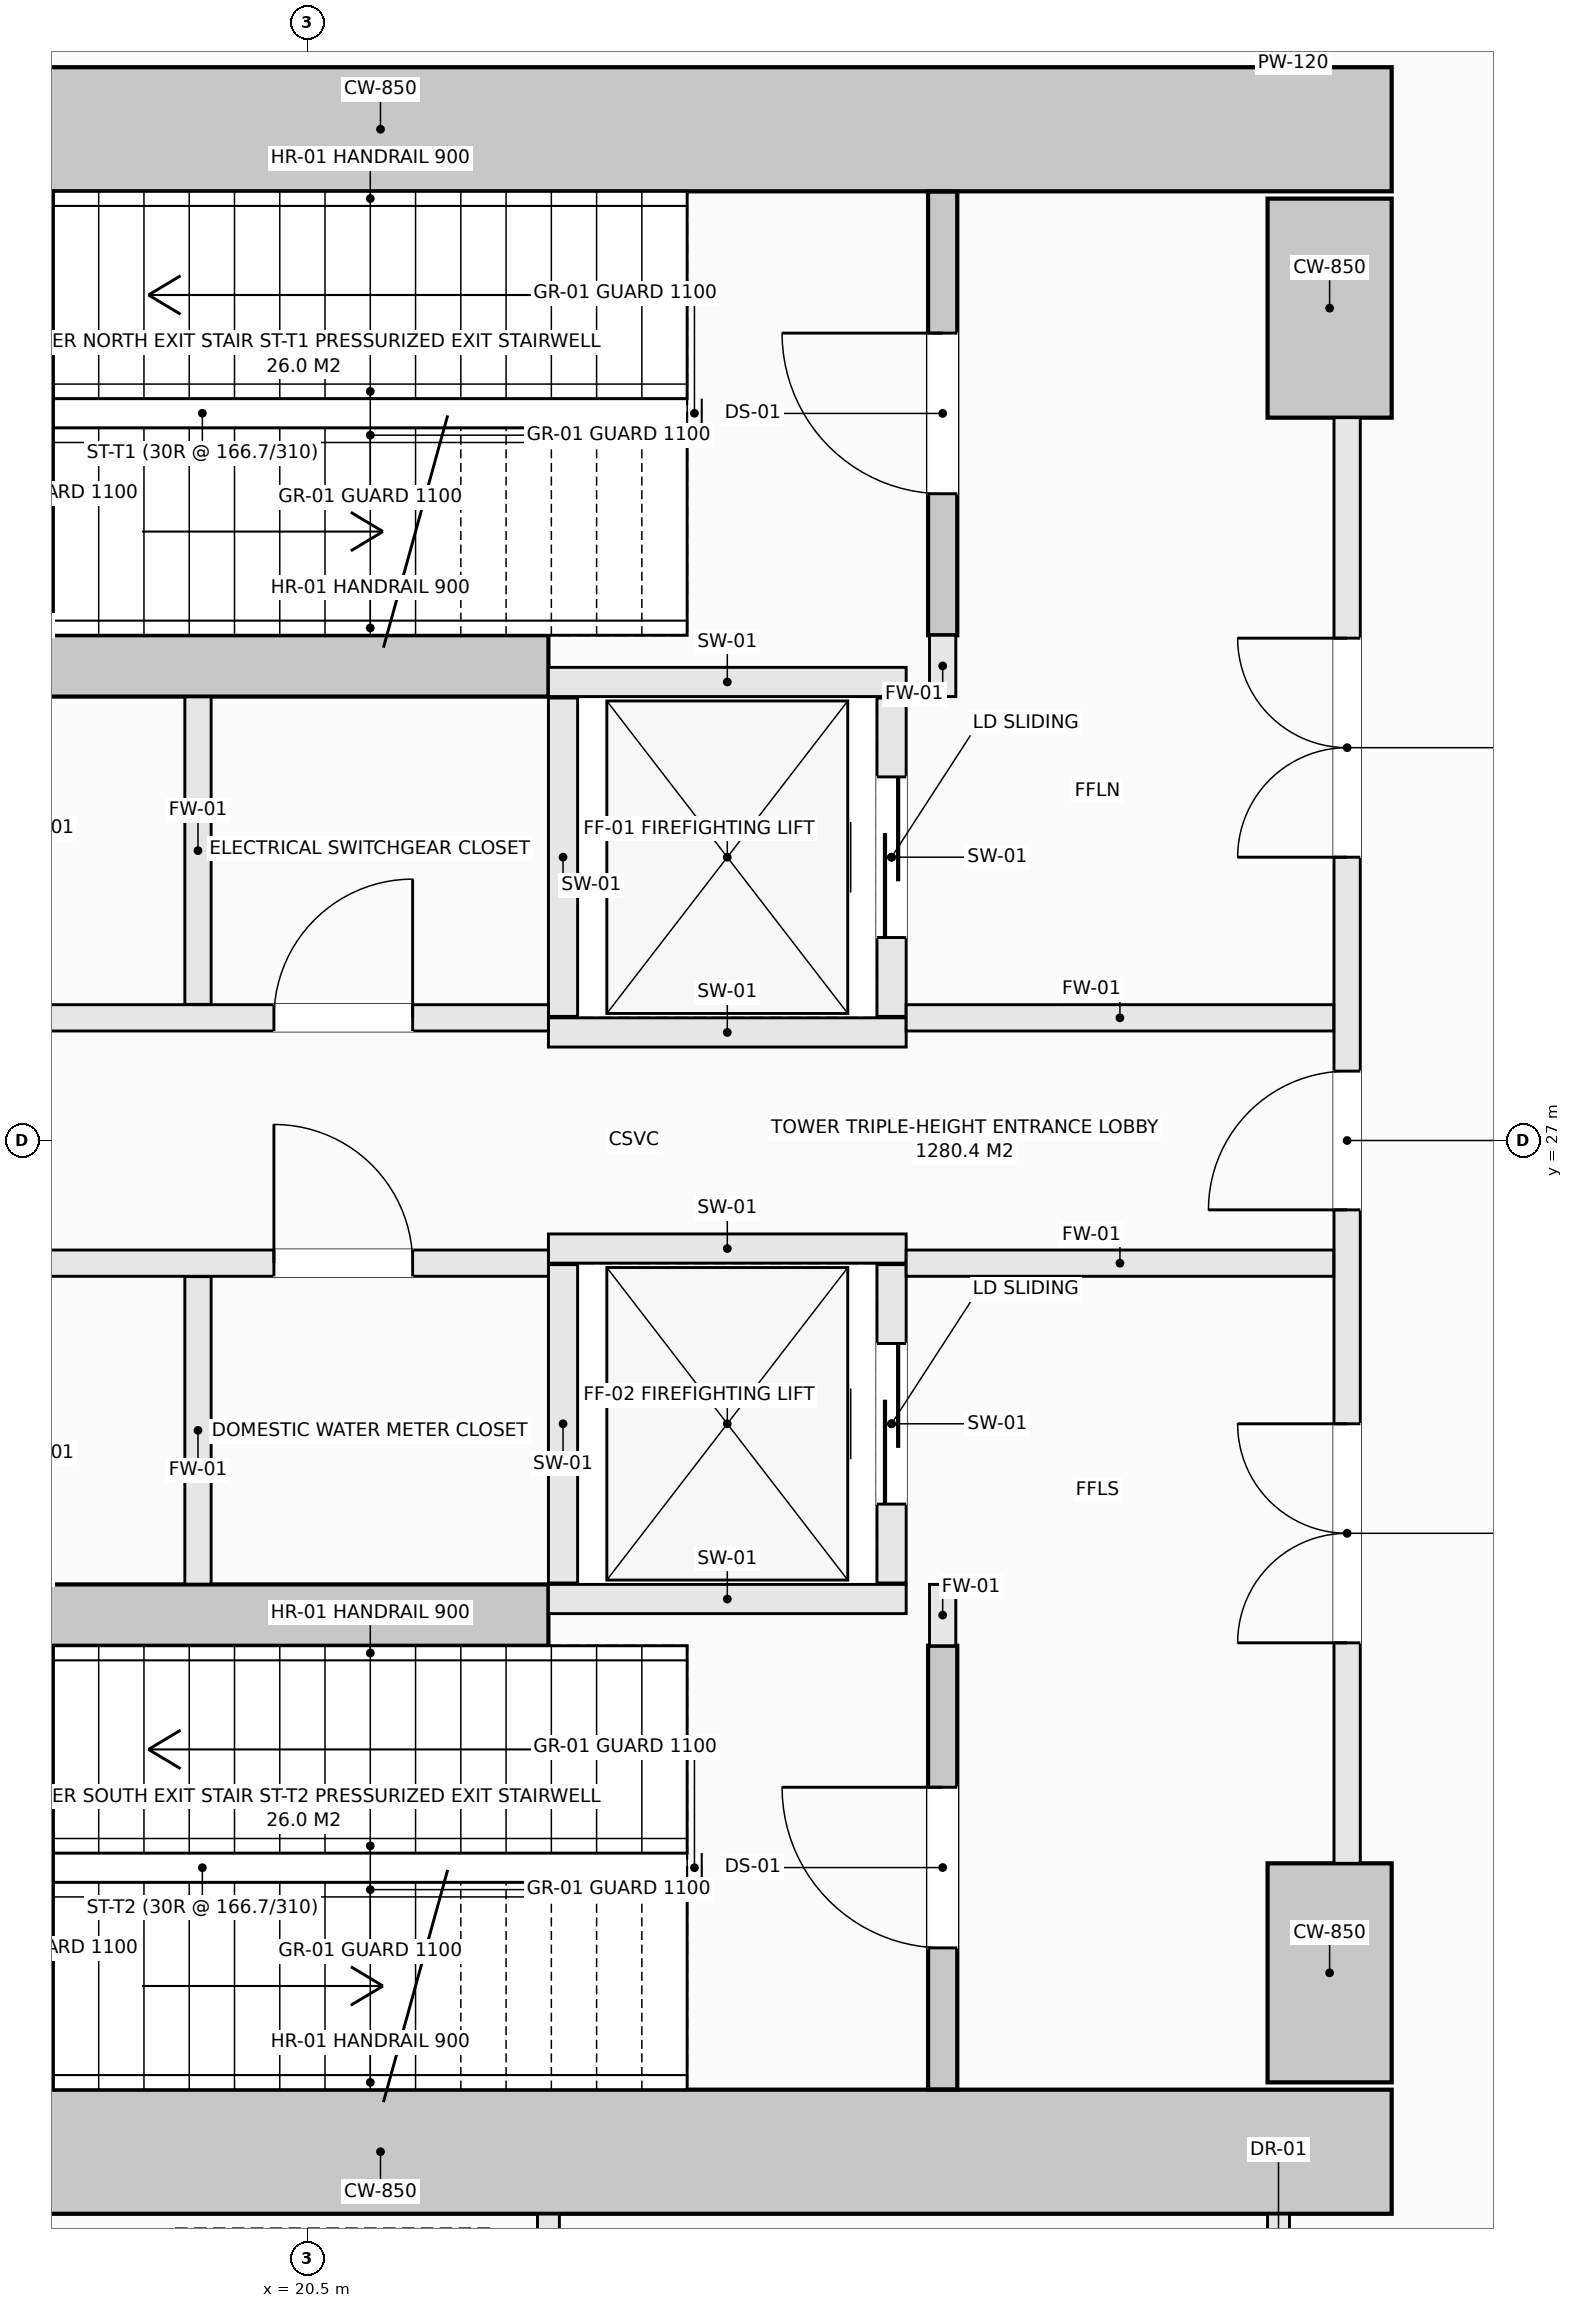
"""IFC4 building model, lengths in metres.
Left out: names, types, materials, properties, quantities, classifications, styles, units other than length and angle.
Written with IfcOpenShell. Run it as: python <this file> out.ifc"""

import sys

from ifc_helpers import new_model, si_unit, direction, frame, frame_2d, origin, place, context, subcontext, project, spatial, rectangle, extrude, element, fill, save


model = new_model("IFC4")
c1 = context("Model", 3, precision=1e-05, world=origin(), true_north=direction((0.0, 1.0)))
c2 = subcontext(c1, "Body", "Model", "MODEL_VIEW")
j1 = project(units=[si_unit("LENGTHUNIT", "METRE"), si_unit("PLANEANGLEUNIT", "RADIAN")], contexts=[c1])
p1 = place(None, origin())
s1 = spatial("IfcSite", under=j1, at=p1, CompositionType="ELEMENT")
p2 = place(p1, origin())
s2 = spatial("IfcBuilding", under=s1, at=p2, CompositionType="ELEMENT")
p3 = place(p2, origin())
s3 = spatial("IfcBuildingStorey", under=s2, at=p3, CompositionType="ELEMENT", Elevation=0.0)
for number, where, z_axis, x_axis in (
    (1, (14.075, 33.925, -0.36), (0.0, 0.0, 1.0), (1.0, 0.0, 0.0)),
    (2, (14.075, 20.075, -0.36), (0.0, 0.0, 1.0), (1.0, 0.0, 0.0)),
):
    element("IfcWall", number, at=place(p3, frame(where, z_axis=z_axis, x_axis=x_axis)), inside=s3, PredefinedType="SHEAR", context=c2, shape_type="SweptSolid", body=[
        extrude(rectangle(XDim=13.85, YDim=0.85, at=frame_2d((6.925, 0.0))), origin(), (0.0, 0.0, 1.0), 5.1),
    ])
for number, where, z_axis, x_axis in (
    (3, (27.5, 31.95, -0.36), (0.0, 0.0, 1.0), (0.0, 1.0, 0.0)),
    (4, (27.5, 20.55, -0.36), (0.0, 0.0, 1.0), (0.0, 1.0, 0.0)),
):
    element("IfcWall", number, at=place(p3, frame(where, z_axis=z_axis, x_axis=x_axis)), inside=s3, PredefinedType="SHEAR", context=c2, shape_type="SweptSolid", body=[
        extrude(rectangle(XDim=1.5, YDim=0.85, at=frame_2d((0.75, 0.0))), origin(), (0.0, 0.0, 1.0), 5.1),
    ])
for number, where, z_axis, x_axis in (
    (5, (14.85, 30.25, -0.36), (0.0, 0.0, 1.0), (1.0, 0.0, 0.0)),
    (6, (14.85, 23.75, -0.36), (0.0, 0.0, 1.0), (1.0, 0.0, 0.0)),
):
    element("IfcWall", number, at=place(p3, frame(where, z_axis=z_axis, x_axis=x_axis)), inside=s3, PredefinedType="SHEAR", context=c2, shape_type="SweptSolid", body=[
        extrude(rectangle(XDim=7.3, YDim=0.42, at=frame_2d((3.65, 0.0))), origin(), (0.0, 0.0, 1.0), 5.1),
    ])
p4 = place(p3, frame((24.85, 30.46, -0.36), z_axis=(0.0, 0.0, 1.0), x_axis=(0.0, 1.0, 0.0)))
e7 = element("IfcWall", 7, at=p4, inside=s3, PredefinedType="SHEAR", context=c2, shape_type="SweptSolid", body=[
    extrude(rectangle(XDim=3.038, YDim=0.2, at=frame_2d((1.519, 0.0))), origin(), (0.0, 0.0, 1.0), 5.1),
])
p5 = place(p4, frame((0.969, 0.0, 0.36)))
e8 = element("IfcOpeningElement", 8, at=p5, cuts=e7, PredefinedType="OPENING", context=c2, shape_type="SweptSolid", body=[
    extrude(rectangle(XDim=1.1, YDim=2.15, at=frame_2d((0.55, 1.075))), frame((0.0, 0.11, 0.0), z_axis=(0.0, -1.0, 0.0), x_axis=(1.0, 0.0, 0.0)), (0.0, 0.0, 1.0), 0.22),
])
p6 = place(p3, frame((24.85, 20.502, -0.36), z_axis=(0.0, 0.0, 1.0), x_axis=(0.0, 1.0, 0.0)))
e9 = element("IfcWall", 9, at=p6, inside=s3, PredefinedType="SHEAR", context=c2, shape_type="SweptSolid", body=[
    extrude(rectangle(XDim=3.038, YDim=0.2, at=frame_2d((1.519, 0.0))), origin(), (0.0, 0.0, 1.0), 5.1),
])
p7 = place(p6, frame((0.969, 0.0, 0.36)))
e10 = element("IfcOpeningElement", 10, at=p7, cuts=e9, PredefinedType="OPENING", context=c2, shape_type="SweptSolid", body=[
    extrude(rectangle(XDim=1.1, YDim=2.15, at=frame_2d((0.55, 1.075))), frame((0.0, 0.11, 0.0), z_axis=(0.0, -1.0, 0.0), x_axis=(1.0, 0.0, 0.0)), (0.0, 0.0, 1.0), 0.22),
])
for number, where, z_axis, x_axis in (
    (11, (22.15, 30.14, 0.0), (0.0, 0.0, 1.0), (1.0, 0.0, 0.0)),
    (12, (22.15, 27.74, 0.0), (0.0, 0.0, 1.0), (1.0, 0.0, 0.0)),
):
    element("IfcWall", number, at=place(p3, frame(where, z_axis=z_axis, x_axis=x_axis)), inside=s3, PredefinedType="SOLIDWALL", context=c2, shape_type="SweptSolid", body=[
        extrude(rectangle(XDim=2.45, YDim=0.2, at=frame_2d((1.225, 0.0))), origin(), (0.0, 0.0, 1.0), 4.74),
    ])
p8 = place(p3, frame((22.25, 27.85, 0.0), z_axis=(0.0, 0.0, 1.0), x_axis=(0.0, 1.0, 0.0)))
e13 = element("IfcWall", 13, at=p8, inside=s3, PredefinedType="SOLIDWALL", context=c2, shape_type="SweptSolid", body=[
    extrude(rectangle(XDim=2.18, YDim=0.2, at=frame_2d((1.09, 0.0))), origin(), (0.0, 0.0, 1.0), 4.74),
])
p9 = place(p3, frame((24.5, 27.85, 0.0), z_axis=(0.0, 0.0, 1.0), x_axis=(0.0, 1.0, 0.0)))
e14 = element("IfcWall", 14, at=p9, inside=s3, PredefinedType="SOLIDWALL", context=c2, shape_type="SweptSolid", body=[
    extrude(rectangle(XDim=2.18, YDim=0.2, at=frame_2d((1.09, 0.0))), origin(), (0.0, 0.0, 1.0), 4.74),
])
p10 = place(p9, frame((0.54, 0.0, 0.0)))
e15 = element("IfcOpeningElement", 15, at=p10, cuts=e14, PredefinedType="OPENING", context=c2, shape_type="SweptSolid", body=[
    extrude(rectangle(XDim=1.1, YDim=2.2, at=frame_2d((0.55, 1.1))), frame((0.0, 0.11, 0.0), z_axis=(0.0, -1.0, 0.0), x_axis=(1.0, 0.0, 0.0)), (0.0, 0.0, 1.0), 0.22),
])
for number, where, z_axis, x_axis in (
    (16, (22.15, 26.26, 0.0), (0.0, 0.0, 1.0), (1.0, 0.0, 0.0)),
    (17, (22.15, 23.86, 0.0), (0.0, 0.0, 1.0), (1.0, 0.0, 0.0)),
):
    element("IfcWall", number, at=place(p3, frame(where, z_axis=z_axis, x_axis=x_axis)), inside=s3, PredefinedType="SOLIDWALL", context=c2, shape_type="SweptSolid", body=[
        extrude(rectangle(XDim=2.45, YDim=0.2, at=frame_2d((1.225, 0.0))), origin(), (0.0, 0.0, 1.0), 4.74),
    ])
p11 = place(p3, frame((22.25, 23.97, 0.0), z_axis=(0.0, 0.0, 1.0), x_axis=(0.0, 1.0, 0.0)))
e18 = element("IfcWall", 18, at=p11, inside=s3, PredefinedType="SOLIDWALL", context=c2, shape_type="SweptSolid", body=[
    extrude(rectangle(XDim=2.18, YDim=0.2, at=frame_2d((1.09, 0.0))), origin(), (0.0, 0.0, 1.0), 4.74),
])
p12 = place(p3, frame((24.5, 23.97, 0.0), z_axis=(0.0, 0.0, 1.0), x_axis=(0.0, 1.0, 0.0)))
e19 = element("IfcWall", 19, at=p12, inside=s3, PredefinedType="SOLIDWALL", context=c2, shape_type="SweptSolid", body=[
    extrude(rectangle(XDim=2.18, YDim=0.2, at=frame_2d((1.09, 0.0))), origin(), (0.0, 0.0, 1.0), 4.74),
])
p13 = place(p12, frame((0.54, 0.0, 0.0)))
e20 = element("IfcOpeningElement", 20, at=p13, cuts=e19, PredefinedType="OPENING", context=c2, shape_type="SweptSolid", body=[
    extrude(rectangle(XDim=1.1, YDim=2.2, at=frame_2d((0.55, 1.1))), frame((0.0, 0.11, 0.0), z_axis=(0.0, -1.0, 0.0), x_axis=(1.0, 0.0, 0.0)), (0.0, 0.0, 1.0), 0.22),
])
for number, where, z_axis, x_axis in (
    (21, (24.85, 23.54, 0.0), (0.0, 0.0, 1.0), (0.0, 1.0, 0.0)),
    (22, (24.85, 30.04, 0.0), (0.0, 0.0, 1.0), (0.0, 1.0, 0.0)),
):
    element("IfcWall", number, at=place(p3, frame(where, z_axis=z_axis, x_axis=x_axis)), inside=s3, PredefinedType="SOLIDWALL", context=c2, shape_type="SweptSolid", body=[
        extrude(rectangle(XDim=0.42, YDim=0.18, at=frame_2d((0.21, 0.0))), origin(), (0.0, 0.0, 1.0), 4.74),
    ])
p14 = place(p3, frame((27.62, 22.05, 0.0), z_axis=(0.0, 0.0, 1.0), x_axis=(0.0, 1.0, 0.0)))
e23 = element("IfcWall", 23, at=p14, inside=s3, PredefinedType="SOLIDWALL", context=c2, shape_type="SweptSolid", body=[
    extrude(rectangle(XDim=9.9, YDim=0.18, at=frame_2d((4.95, 0.0))), origin(), (0.0, 0.0, 1.0), 3.832),
])
p15 = place(p14, frame((4.475, 0.0, 0.0)))
e24 = element("IfcOpeningElement", 24, at=p15, cuts=e23, PredefinedType="OPENING", context=c2, shape_type="SweptSolid", body=[
    extrude(rectangle(XDim=0.95, YDim=2.1, at=frame_2d((0.475, 1.05))), frame((0.0, 0.1, 0.0), z_axis=(0.0, -1.0, 0.0), x_axis=(1.0, 0.0, 0.0)), (0.0, 0.0, 1.0), 0.2),
])
p16 = place(p14, frame((6.89, 0.0, 0.0)))
e25 = element("IfcOpeningElement", 25, at=p16, cuts=e23, PredefinedType="OPENING", context=c2, shape_type="SweptSolid", body=[
    extrude(rectangle(XDim=1.5, YDim=2.2, at=frame_2d((0.75, 1.1))), frame((0.0, 0.1, 0.0), z_axis=(0.0, -1.0, 0.0), x_axis=(1.0, 0.0, 0.0)), (0.0, 0.0, 1.0), 0.2),
])
p17 = place(p14, frame((1.51, 0.0, 0.0)))
e26 = element("IfcOpeningElement", 26, at=p17, cuts=e23, PredefinedType="OPENING", context=c2, shape_type="SweptSolid", body=[
    extrude(rectangle(XDim=1.5, YDim=2.2, at=frame_2d((0.75, 1.1))), frame((0.0, 0.1, 0.0), z_axis=(0.0, -1.0, 0.0), x_axis=(1.0, 0.0, 0.0)), (0.0, 0.0, 1.0), 0.2),
])
p18 = place(p3, frame((15.25, 27.84, 0.0), z_axis=(0.0, 0.0, 1.0), x_axis=(1.0, 0.0, 0.0)))
e27 = element("IfcWall", 27, at=p18, inside=s3, PredefinedType="SOLIDWALL", context=c2, shape_type="SweptSolid", body=[
    extrude(rectangle(XDim=6.9, YDim=0.18, at=frame_2d((3.45, 0.0))), origin(), (0.0, 0.0, 1.0), 4.74),
])
p19 = place(p18, frame((5.02, 0.0, 0.0)))
e28 = element("IfcOpeningElement", 28, at=p19, cuts=e27, PredefinedType="OPENING", context=c2, shape_type="SweptSolid", body=[
    extrude(rectangle(XDim=0.95, YDim=2.1, at=frame_2d((0.475, 1.05))), frame((0.0, 0.1, 0.0), z_axis=(0.0, -1.0, 0.0), x_axis=(1.0, 0.0, 0.0)), (0.0, 0.0, 1.0), 0.2),
])
p20 = place(p18, frame((1.98, 0.0, 0.0)))
e29 = element("IfcOpeningElement", 29, at=p20, cuts=e27, PredefinedType="OPENING", context=c2, shape_type="SweptSolid", body=[
    extrude(rectangle(XDim=0.95, YDim=2.1, at=frame_2d((0.475, 1.05))), frame((0.0, 0.1, 0.0), z_axis=(0.0, -1.0, 0.0), x_axis=(1.0, 0.0, 0.0)), (0.0, 0.0, 1.0), 0.2),
])
p21 = place(p3, frame((24.6, 27.84, 0.0), z_axis=(0.0, 0.0, 1.0), x_axis=(1.0, 0.0, 0.0)))
e30 = element("IfcWall", 30, at=p21, inside=s3, PredefinedType="SOLIDWALL", context=c2, shape_type="SweptSolid", body=[
    extrude(rectangle(XDim=2.928, YDim=0.18, at=frame_2d((1.464, 0.0))), origin(), (0.0, 0.0, 1.0), 4.74),
])
p22 = place(p3, frame((15.25, 26.16, 0.0), z_axis=(0.0, 0.0, 1.0), x_axis=(1.0, 0.0, 0.0)))
e31 = element("IfcWall", 31, at=p22, inside=s3, PredefinedType="SOLIDWALL", context=c2, shape_type="SweptSolid", body=[
    extrude(rectangle(XDim=6.9, YDim=0.18, at=frame_2d((3.45, 0.0))), origin(), (0.0, 0.0, 1.0), 4.74),
])
p23 = place(p22, frame((5.02, 0.0, 0.0)))
e32 = element("IfcOpeningElement", 32, at=p23, cuts=e31, PredefinedType="OPENING", context=c2, shape_type="SweptSolid", body=[
    extrude(rectangle(XDim=0.95, YDim=2.1, at=frame_2d((0.475, 1.05))), frame((0.0, 0.1, 0.0), z_axis=(0.0, -1.0, 0.0), x_axis=(1.0, 0.0, 0.0)), (0.0, 0.0, 1.0), 0.2),
])
p24 = place(p22, frame((1.98, 0.0, 0.0)))
e33 = element("IfcOpeningElement", 33, at=p24, cuts=e31, PredefinedType="OPENING", context=c2, shape_type="SweptSolid", body=[
    extrude(rectangle(XDim=0.95, YDim=2.1, at=frame_2d((0.475, 1.05))), frame((0.0, 0.1, 0.0), z_axis=(0.0, -1.0, 0.0), x_axis=(1.0, 0.0, 0.0)), (0.0, 0.0, 1.0), 0.2),
])
p25 = place(p3, frame((24.6, 26.16, 0.0), z_axis=(0.0, 0.0, 1.0), x_axis=(1.0, 0.0, 0.0)))
e34 = element("IfcWall", 34, at=p25, inside=s3, PredefinedType="SOLIDWALL", context=c2, shape_type="SweptSolid", body=[
    extrude(rectangle(XDim=2.928, YDim=0.18, at=frame_2d((1.464, 0.0))), origin(), (0.0, 0.0, 1.0), 4.74),
])
for number, where, z_axis, x_axis in (
    (35, (19.75, 23.962, 0.0), (0.0, 0.0, 1.0), (0.0, 1.0, 0.0)),
    (36, (19.75, 27.932, 0.0), (0.0, 0.0, 1.0), (0.0, 1.0, 0.0)),
):
    element("IfcWall", number, at=place(p3, frame(where, z_axis=z_axis, x_axis=x_axis)), inside=s3, PredefinedType="SOLIDWALL", context=c2, shape_type="SweptSolid", body=[
        extrude(rectangle(XDim=2.106, YDim=0.18, at=frame_2d((1.053, 0.0))), origin(), (0.0, 0.0, 1.0), 4.74),
    ])
p26 = place(p3, frame((22.15, 17.127, 0.0), z_axis=(0.0, 0.0, 1.0), x_axis=(0.0, 1.0, 0.0)))
e37 = element("IfcWall", 37, at=p26, inside=s3, PredefinedType="PARTITIONING", context=c2, shape_type="SweptSolid", body=[
    extrude(rectangle(XDim=2.521, YDim=0.15, at=frame_2d((1.26, 0.0))), origin(), (0.0, 0.0, 1.0), 4.74),
])
p27 = place(p3, frame((27.15, 17.127, 0.0), z_axis=(0.0, 0.0, 1.0), x_axis=(0.0, 1.0, 0.0)))
e38 = element("IfcWall", 38, at=p27, inside=s3, PredefinedType="PARTITIONING", context=c2, shape_type="SweptSolid", body=[
    extrude(rectangle(XDim=2.521, YDim=0.15, at=frame_2d((1.26, 0.0))), origin(), (0.0, 0.0, 1.0), 4.74),
])
p28 = place(p27, frame((0.785, 0.0, 0.0)))
e39 = element("IfcOpeningElement", 39, at=p28, cuts=e38, PredefinedType="OPENING", context=c2, shape_type="SweptSolid", body=[
    extrude(rectangle(XDim=0.95, YDim=2.1, at=frame_2d((0.475, 1.05))), frame((0.0, 0.085, 0.0), z_axis=(0.0, -1.0, 0.0), x_axis=(1.0, 0.0, 0.0)), (0.0, 0.0, 1.0), 0.17),
])
p29 = place(p3, frame((27.25, 34.352, 0.0), z_axis=(0.0, 0.0, 1.0), x_axis=(0.0, 1.0, 0.0)))
e40 = element("IfcWall", 40, at=p29, inside=s3, PredefinedType="PARTITIONING", context=c2, shape_type="SweptSolid", body=[
    extrude(rectangle(XDim=0.606, YDim=0.12, at=frame_2d((0.303, 0.0))), origin(), (0.0, 0.0, 1.0), 4.74),
])
p30 = place(p5, origin())
e41 = element("IfcDoor", 41, at=p30, inside=s3, OperationType="SINGLE_SWING_RIGHT", PredefinedType="DOOR", context=c2, shape_type="SweptSolid", body=[
    extrude(rectangle(XDim=1.1, YDim=2.15, at=frame_2d((0.55, 1.075))), frame((0.0, 0.025, 0.0), z_axis=(0.0, -1.0, 0.0), x_axis=(1.0, 0.0, 0.0)), (0.0, 0.0, 1.0), 0.05),
])
fill(e8, e41)
p31 = place(p7, origin())
e42 = element("IfcDoor", 42, at=p31, inside=s3, OperationType="SINGLE_SWING_RIGHT", PredefinedType="DOOR", context=c2, shape_type="SweptSolid", body=[
    extrude(rectangle(XDim=1.1, YDim=2.15, at=frame_2d((0.55, 1.075))), frame((0.0, 0.025, 0.0), z_axis=(0.0, -1.0, 0.0), x_axis=(1.0, 0.0, 0.0)), (0.0, 0.0, 1.0), 0.05),
])
fill(e10, e42)
p32 = place(p10, origin())
e43 = element("IfcDoor", 43, at=p32, inside=s3, OperationType="SLIDING_TO_LEFT", PredefinedType="DOOR", context=c2, shape_type="SweptSolid", body=[
    extrude(rectangle(XDim=1.1, YDim=2.2, at=frame_2d((0.55, 1.1))), frame((0.0, 0.025, 0.0), z_axis=(0.0, -1.0, 0.0), x_axis=(1.0, 0.0, 0.0)), (0.0, 0.0, 1.0), 0.05),
])
fill(e15, e43)
p33 = place(p13, origin())
e44 = element("IfcDoor", 44, at=p33, inside=s3, OperationType="SLIDING_TO_LEFT", PredefinedType="DOOR", context=c2, shape_type="SweptSolid", body=[
    extrude(rectangle(XDim=1.1, YDim=2.2, at=frame_2d((0.55, 1.1))), frame((0.0, 0.025, 0.0), z_axis=(0.0, -1.0, 0.0), x_axis=(1.0, 0.0, 0.0)), (0.0, 0.0, 1.0), 0.05),
])
fill(e20, e44)
p34 = place(p15, origin())
e45 = element("IfcDoor", 45, at=p34, inside=s3, OperationType="SINGLE_SWING_LEFT", PredefinedType="DOOR", context=c2, shape_type="SweptSolid", body=[
    extrude(rectangle(XDim=0.95, YDim=2.1, at=frame_2d((0.475, 1.05))), frame((0.0, 0.025, 0.0), z_axis=(0.0, -1.0, 0.0), x_axis=(1.0, 0.0, 0.0)), (0.0, 0.0, 1.0), 0.05),
])
fill(e24, e45)
p35 = place(p16, origin())
e46 = element("IfcDoor", 46, at=p35, inside=s3, OperationType="DOUBLE_DOOR_SINGLE_SWING", PredefinedType="DOOR", context=c2, shape_type="SweptSolid", body=[
    extrude(rectangle(XDim=1.5, YDim=2.2, at=frame_2d((0.75, 1.1))), frame((0.0, 0.025, 0.0), z_axis=(0.0, -1.0, 0.0), x_axis=(1.0, 0.0, 0.0)), (0.0, 0.0, 1.0), 0.05),
])
fill(e25, e46)
p36 = place(p17, origin())
e47 = element("IfcDoor", 47, at=p36, inside=s3, OperationType="DOUBLE_DOOR_SINGLE_SWING", PredefinedType="DOOR", context=c2, shape_type="SweptSolid", body=[
    extrude(rectangle(XDim=1.5, YDim=2.2, at=frame_2d((0.75, 1.1))), frame((0.0, 0.025, 0.0), z_axis=(0.0, -1.0, 0.0), x_axis=(1.0, 0.0, 0.0)), (0.0, 0.0, 1.0), 0.05),
])
fill(e26, e47)
p37 = place(p19, origin())
e48 = element("IfcDoor", 48, at=p37, inside=s3, OperationType="SINGLE_SWING_RIGHT", PredefinedType="DOOR", context=c2, shape_type="SweptSolid", body=[
    extrude(rectangle(XDim=0.95, YDim=2.1, at=frame_2d((0.475, 1.05))), frame((0.0, 0.025, 0.0), z_axis=(0.0, -1.0, 0.0), x_axis=(1.0, 0.0, 0.0)), (0.0, 0.0, 1.0), 0.05),
])
fill(e28, e48)
p38 = place(p23, origin())
e49 = element("IfcDoor", 49, at=p38, inside=s3, OperationType="SINGLE_SWING_LEFT", PredefinedType="DOOR", context=c2, shape_type="SweptSolid", body=[
    extrude(rectangle(XDim=0.95, YDim=2.1, at=frame_2d((0.475, 1.05))), frame((0.0, 0.025, 0.0), z_axis=(0.0, -1.0, 0.0), x_axis=(1.0, 0.0, 0.0)), (0.0, 0.0, 1.0), 0.05),
])
fill(e32, e49)
save(model, sys.argv[1])
